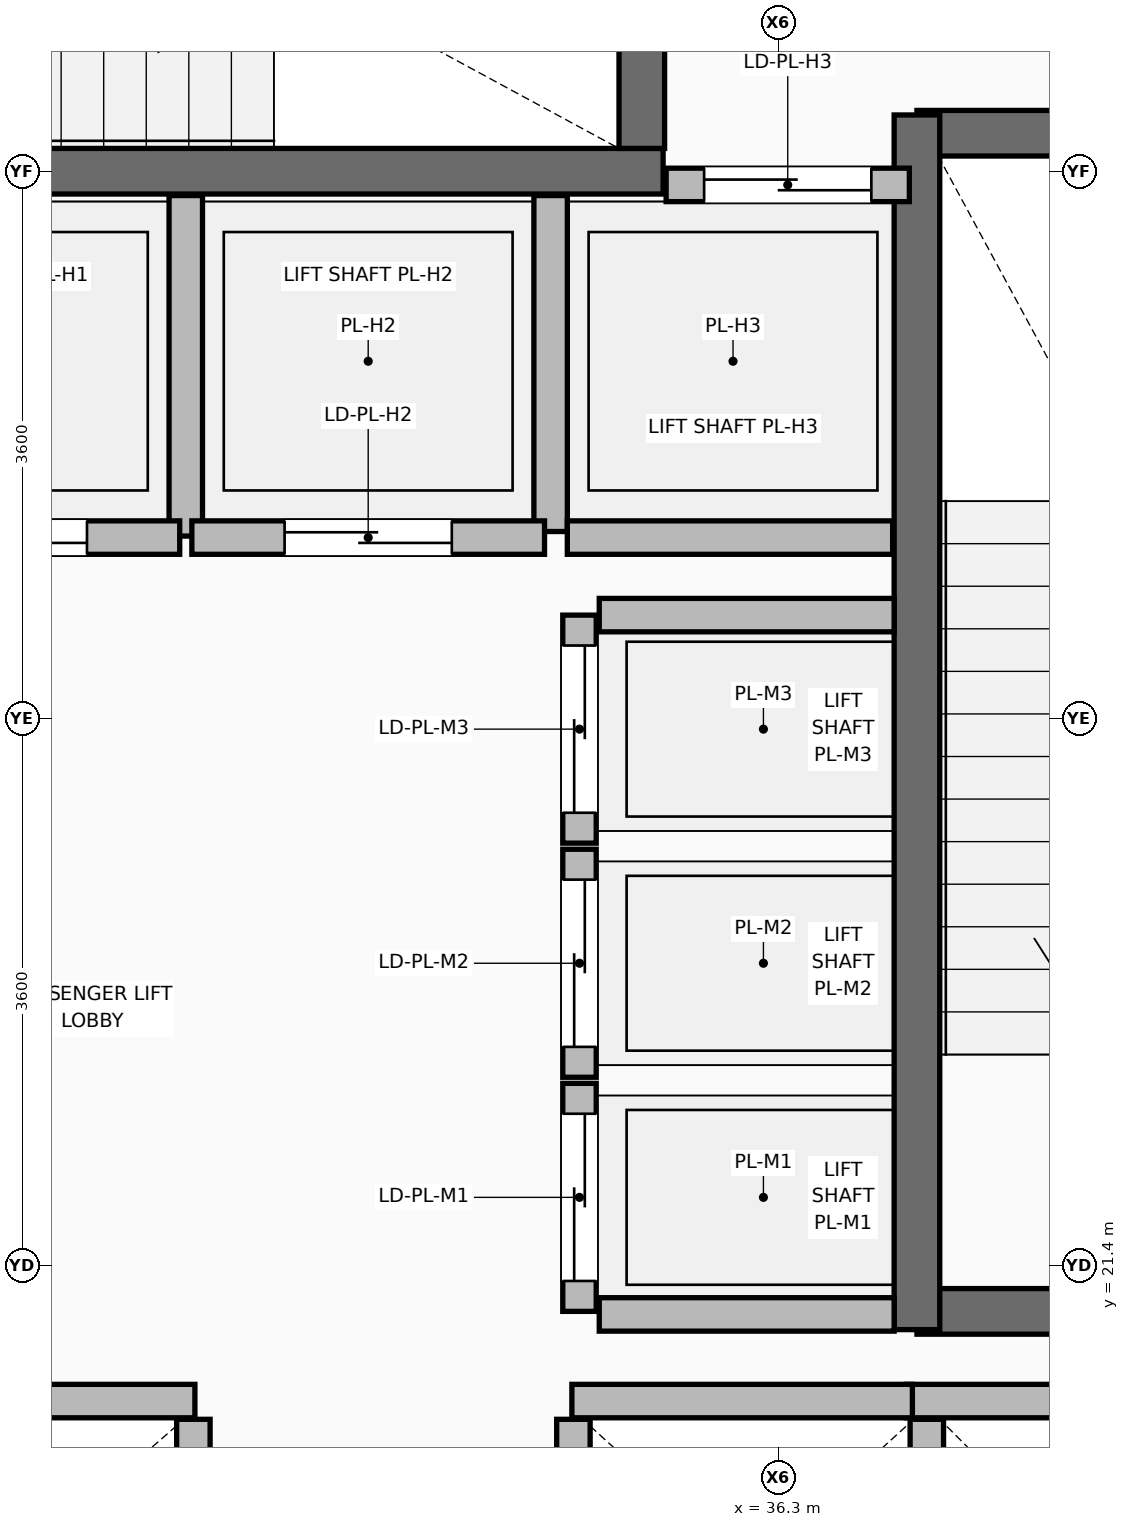
"""IFC4 building model, lengths in metres.
Left out: names, types, materials, properties, quantities, classifications, styles, units other than length and angle.
Written with IfcOpenShell. Run it as: python <this file> out.ifc"""

import sys

from ifc_helpers import new_model, si_unit, direction, frame, frame_2d, origin, place, context, subcontext, project, spatial, rectangle, extrude, element, fill, save


model = new_model("IFC4")
c1 = context("Model", 3, precision=1e-05, world=origin(), true_north=direction((0.0, 1.0)))
c2 = subcontext(c1, "Body", "Model", "MODEL_VIEW")
j1 = project(units=[si_unit("LENGTHUNIT", "METRE"), si_unit("PLANEANGLEUNIT", "RADIAN")], contexts=[c1])
p1 = place(None, origin())
s1 = spatial("IfcSite", under=j1, at=p1, CompositionType="ELEMENT")
p2 = place(p1, origin())
s2 = spatial("IfcBuilding", under=s1, at=p2, CompositionType="ELEMENT")
p3 = place(p2, frame((0.0, 0.0, 96.15)))
s3 = spatial("IfcBuildingStorey", under=s2, at=p3, CompositionType="ELEMENT", Elevation=96.15)
for number, where, z_axis, x_axis in (
    (1, (32.45, 17.92, 0.0), (0.0, 0.0, 1.0), (0.0, 1.0, 0.0)),
    (2, (34.95, 17.92, 0.0), (0.0, 0.0, 1.0), (0.0, 1.0, 0.0)),
):
    element("IfcWall", number, at=place(p3, frame(where, z_axis=z_axis, x_axis=x_axis)), inside=s3, PredefinedType="PARTITIONING", context=c2, shape_type="SweptSolid", body=[
        extrude(rectangle(XDim=2.47, YDim=0.22, at=frame_2d((1.235, 0.0))), origin(), (0.0, 0.0, 1.0), 4.056),
    ])
p4 = place(p3, frame((37.275, 18.08, 0.0), z_axis=(0.0, 0.0, 1.0), x_axis=(0.0, 1.0, 0.0)))
e3 = element("IfcWall", 3, at=p4, inside=s3, PredefinedType="PARTITIONING", context=c2, shape_type="SweptSolid", body=[
    extrude(rectangle(XDim=2.31, YDim=0.22, at=frame_2d((1.155, 0.0))), origin(), (0.0, 0.0, 1.0), 4.595),
])
p5 = place(p3, frame((32.4, 26.2, 0.0), z_axis=(0.0, 0.0, 1.0), x_axis=(0.0, 1.0, 0.0)))
e4 = element("IfcWall", 4, at=p5, inside=s3, PredefinedType="PARTITIONING", context=c2, shape_type="SweptSolid", body=[
    extrude(rectangle(XDim=2.24, YDim=0.22, at=frame_2d((1.12, 0.0))), origin(), (0.0, 0.0, 1.0), 4.595),
])
p6 = place(p3, frame((34.8, 26.23, 0.0), z_axis=(0.0, 0.0, 1.0), x_axis=(0.0, 1.0, 0.0)))
e5 = element("IfcWall", 5, at=p6, inside=s3, PredefinedType="PARTITIONING", context=c2, shape_type="SweptSolid", body=[
    extrude(rectangle(XDim=2.21, YDim=0.22, at=frame_2d((1.105, 0.0))), origin(), (0.0, 0.0, 1.0), 4.595),
])
p7 = place(p3, frame((34.91, 26.19, 0.0), z_axis=(0.0, 0.0, 1.0), x_axis=(1.0, 0.0, 0.0)))
e6 = element("IfcWall", 6, at=p7, inside=s3, PredefinedType="PARTITIONING", context=c2, shape_type="SweptSolid", body=[
    extrude(rectangle(XDim=2.14, YDim=0.22, at=frame_2d((1.07, 0.0))), origin(), (0.0, 0.0, 1.0), 4.595),
])
for number, where, z_axis, x_axis in (
    (7, (37.21, 21.1, 0.0), (0.0, 0.0, 1.0), (1.0, 0.0, 0.0)),
    (8, (37.21, 28.85, 0.0), (0.0, 0.0, 1.0), (1.0, 0.0, 0.0)),
):
    element("IfcWall", number, at=place(p3, frame(where, z_axis=z_axis, x_axis=x_axis)), inside=s3, PredefinedType="SHEAR", context=c2, shape_type="SweptSolid", body=[
        extrude(rectangle(XDim=3.615, YDim=0.3, at=frame_2d((1.808, 0.0))), origin(), (0.0, 0.0, 1.0), 4.62),
    ])
p8 = place(p3, frame((37.21, 20.98, 0.0), z_axis=(0.0, 0.0, 1.0), x_axis=(0.0, 1.0, 0.0)))
e9 = element("IfcWall", 9, at=p8, inside=s3, PredefinedType="SHEAR", context=c2, shape_type="SweptSolid", body=[
    extrude(rectangle(XDim=7.99, YDim=0.3, at=frame_2d((3.995, 0.0))), origin(), (0.0, 0.0, 1.0), 4.62),
])
p9 = place(p3, frame((27.51, 28.6, 0.0), z_axis=(0.0, 0.0, 1.0), x_axis=(1.0, 0.0, 0.0)))
e10 = element("IfcWall", 10, at=p9, inside=s3, PredefinedType="SHEAR", context=c2, shape_type="SweptSolid", body=[
    extrude(rectangle(XDim=8.03, YDim=0.3, at=frame_2d((4.015, 0.0))), origin(), (0.0, 0.0, 1.0), 4.62),
])
p10 = place(p3, frame((35.4, 28.75, 0.0), z_axis=(0.0, 0.0, 1.0), x_axis=(0.0, 1.0, 0.0)))
e11 = element("IfcWall", 11, at=p10, inside=s3, PredefinedType="SHEAR", context=c2, shape_type="SweptSolid", body=[
    extrude(rectangle(XDim=3.425, YDim=0.3, at=frame_2d((1.712, 0.0))), origin(), (0.0, 0.0, 1.0), 4.62),
])
p11 = place(p3, frame((30.04, 20.51, 0.0), z_axis=(0.0, 0.0, 1.0), x_axis=(1.0, 0.0, 0.0)))
e12 = element("IfcWall", 12, at=p11, inside=s3, PredefinedType="PARTITIONING", context=c2, shape_type="SweptSolid", body=[
    extrude(rectangle(XDim=2.42, YDim=0.22, at=frame_2d((1.21, 0.0))), origin(), (0.0, 0.0, 1.0), 4.6),
])
for number, where, z_axis, x_axis in (
    (13, (37.14, 20.51, 0.0), (0.0, 0.0, 1.0), (1.0, 0.0, 0.0)),
    (14, (34.94, 20.51, 0.0), (0.0, 0.0, 1.0), (1.0, 0.0, 0.0)),
):
    element("IfcWall", number, at=place(p3, frame(where, z_axis=z_axis, x_axis=x_axis)), inside=s3, PredefinedType="PARTITIONING", context=c2, shape_type="SweptSolid", body=[
        extrude(rectangle(XDim=2.24, YDim=0.22, at=frame_2d((1.12, 0.0))), origin(), (0.0, 0.0, 1.0), 4.6),
    ])
p12 = place(p3, frame((30.04, 26.19, 0.0), z_axis=(0.0, 0.0, 1.0), x_axis=(1.0, 0.0, 0.0)))
e15 = element("IfcWall", 15, at=p12, inside=s3, PredefinedType="PARTITIONING", context=c2, shape_type="SweptSolid", body=[
    extrude(rectangle(XDim=2.32, YDim=0.22, at=frame_2d((1.16, 0.0))), origin(), (0.0, 0.0, 1.0), 4.6),
])
p13 = place(p12, frame((0.61, 0.0, 0.0)))
e16 = element("IfcOpeningElement", 16, at=p13, cuts=e15, PredefinedType="OPENING", context=c2, shape_type="SweptSolid", body=[
    extrude(rectangle(XDim=1.1, YDim=2.2, at=frame_2d((0.55, 1.1))), frame((0.0, 0.12, 0.0), z_axis=(0.0, -1.0, 0.0), x_axis=(1.0, 0.0, 0.0)), (0.0, 0.0, 1.0), 0.24),
])
p14 = place(p3, frame((32.44, 26.19, 0.0), z_axis=(0.0, 0.0, 1.0), x_axis=(1.0, 0.0, 0.0)))
e17 = element("IfcWall", 17, at=p14, inside=s3, PredefinedType="PARTITIONING", context=c2, shape_type="SweptSolid", body=[
    extrude(rectangle(XDim=2.32, YDim=0.22, at=frame_2d((1.16, 0.0))), origin(), (0.0, 0.0, 1.0), 4.6),
])
p15 = place(p14, frame((0.61, 0.0, 0.0)))
e18 = element("IfcOpeningElement", 18, at=p15, cuts=e17, PredefinedType="OPENING", context=c2, shape_type="SweptSolid", body=[
    extrude(rectangle(XDim=1.1, YDim=2.2, at=frame_2d((0.55, 1.1))), frame((0.0, 0.12, 0.0), z_axis=(0.0, -1.0, 0.0), x_axis=(1.0, 0.0, 0.0)), (0.0, 0.0, 1.0), 0.24),
])
p16 = place(p3, frame((35.56, 28.51, 0.0), z_axis=(0.0, 0.0, 1.0), x_axis=(1.0, 0.0, 0.0)))
e19 = element("IfcWall", 19, at=p16, inside=s3, PredefinedType="PARTITIONING", context=c2, shape_type="SweptSolid", body=[
    extrude(rectangle(XDim=1.6, YDim=0.22, at=frame_2d((0.8, 0.0))), origin(), (0.0, 0.0, 1.0), 4.6),
])
p17 = place(p16, frame((0.25, 0.0, 0.0)))
e20 = element("IfcOpeningElement", 20, at=p17, cuts=e19, PredefinedType="OPENING", context=c2, shape_type="SweptSolid", body=[
    extrude(rectangle(XDim=1.1, YDim=2.2, at=frame_2d((0.55, 1.1))), frame((0.0, 0.12, 0.0), z_axis=(0.0, -1.0, 0.0), x_axis=(1.0, 0.0, 0.0)), (0.0, 0.0, 1.0), 0.24),
])
p18 = place(p3, frame((34.99, 21.1, 0.0), z_axis=(0.0, 0.0, 1.0), x_axis=(0.0, 1.0, 0.0)))
e21 = element("IfcWall", 21, at=p18, inside=s3, PredefinedType="PARTITIONING", context=c2, shape_type="SweptSolid", body=[
    extrude(rectangle(XDim=1.5, YDim=0.22, at=frame_2d((0.75, 0.0))), origin(), (0.0, 0.0, 1.0), 4.6),
])
p19 = place(p18, frame((0.2, 0.0, 0.0)))
e22 = element("IfcOpeningElement", 22, at=p19, cuts=e21, PredefinedType="OPENING", context=c2, shape_type="SweptSolid", body=[
    extrude(rectangle(XDim=1.1, YDim=2.2, at=frame_2d((0.55, 1.1))), frame((0.0, 0.12, 0.0), z_axis=(0.0, -1.0, 0.0), x_axis=(1.0, 0.0, 0.0)), (0.0, 0.0, 1.0), 0.24),
])
p20 = place(p3, frame((34.99, 22.64, 0.0), z_axis=(0.0, 0.0, 1.0), x_axis=(0.0, 1.0, 0.0)))
e23 = element("IfcWall", 23, at=p20, inside=s3, PredefinedType="PARTITIONING", context=c2, shape_type="SweptSolid", body=[
    extrude(rectangle(XDim=1.5, YDim=0.22, at=frame_2d((0.75, 0.0))), origin(), (0.0, 0.0, 1.0), 4.6),
])
p21 = place(p20, frame((0.2, 0.0, 0.0)))
e24 = element("IfcOpeningElement", 24, at=p21, cuts=e23, PredefinedType="OPENING", context=c2, shape_type="SweptSolid", body=[
    extrude(rectangle(XDim=1.1, YDim=2.2, at=frame_2d((0.55, 1.1))), frame((0.0, 0.12, 0.0), z_axis=(0.0, -1.0, 0.0), x_axis=(1.0, 0.0, 0.0)), (0.0, 0.0, 1.0), 0.24),
])
p22 = place(p3, frame((34.99, 24.18, 0.0), z_axis=(0.0, 0.0, 1.0), x_axis=(0.0, 1.0, 0.0)))
e25 = element("IfcWall", 25, at=p22, inside=s3, PredefinedType="PARTITIONING", context=c2, shape_type="SweptSolid", body=[
    extrude(rectangle(XDim=1.5, YDim=0.22, at=frame_2d((0.75, 0.0))), origin(), (0.0, 0.0, 1.0), 4.6),
])
p23 = place(p22, frame((0.2, 0.0, 0.0)))
e26 = element("IfcOpeningElement", 26, at=p23, cuts=e25, PredefinedType="OPENING", context=c2, shape_type="SweptSolid", body=[
    extrude(rectangle(XDim=1.1, YDim=2.2, at=frame_2d((0.55, 1.1))), frame((0.0, 0.12, 0.0), z_axis=(0.0, -1.0, 0.0), x_axis=(1.0, 0.0, 0.0)), (0.0, 0.0, 1.0), 0.24),
])
for number, where, z_axis, x_axis in (
    (27, (35.12, 21.08, 0.0), (0.0, 0.0, 1.0), (1.0, 0.0, 0.0)),
    (28, (35.12, 25.68, 0.0), (0.0, 0.0, 1.0), (1.0, 0.0, 0.0)),
):
    element("IfcWall", number, at=place(p3, frame(where, z_axis=z_axis, x_axis=x_axis)), inside=s3, PredefinedType="PARTITIONING", context=c2, shape_type="SweptSolid", body=[
        extrude(rectangle(XDim=1.94, YDim=0.22, at=frame_2d((0.97, 0.0))), origin(), (0.0, 0.0, 1.0), 4.6),
    ])
p24 = place(p13, frame((1.1, 0.0, 0.0), z_axis=(0.0, 0.0, 1.0), x_axis=(-1.0, 0.0, 0.0)))
e29 = element("IfcDoor", 29, at=p24, inside=s3, OperationType="DOUBLE_DOOR_SLIDING", PredefinedType="DOOR", context=c2, shape_type="SweptSolid", body=[
    extrude(rectangle(XDim=1.1, YDim=2.2, at=frame_2d((0.55, 1.1))), frame((0.0, 0.025, 0.0), z_axis=(0.0, -1.0, 0.0), x_axis=(1.0, 0.0, 0.0)), (0.0, 0.0, 1.0), 0.05),
])
fill(e16, e29)
p25 = place(p15, frame((1.1, 0.0, 0.0), z_axis=(0.0, 0.0, 1.0), x_axis=(-1.0, 0.0, 0.0)))
e30 = element("IfcDoor", 30, at=p25, inside=s3, OperationType="DOUBLE_DOOR_SLIDING", PredefinedType="DOOR", context=c2, shape_type="SweptSolid", body=[
    extrude(rectangle(XDim=1.1, YDim=2.2, at=frame_2d((0.55, 1.1))), frame((0.0, 0.025, 0.0), z_axis=(0.0, -1.0, 0.0), x_axis=(1.0, 0.0, 0.0)), (0.0, 0.0, 1.0), 0.05),
])
fill(e18, e30)
p26 = place(p17, origin())
e31 = element("IfcDoor", 31, at=p26, inside=s3, OperationType="DOUBLE_DOOR_SLIDING", PredefinedType="DOOR", context=c2, shape_type="SweptSolid", body=[
    extrude(rectangle(XDim=1.1, YDim=2.2, at=frame_2d((0.55, 1.1))), frame((0.0, 0.025, 0.0), z_axis=(0.0, -1.0, 0.0), x_axis=(1.0, 0.0, 0.0)), (0.0, 0.0, 1.0), 0.05),
])
fill(e20, e31)
p27 = place(p19, origin())
e32 = element("IfcDoor", 32, at=p27, inside=s3, OperationType="DOUBLE_DOOR_SLIDING", PredefinedType="DOOR", context=c2, shape_type="SweptSolid", body=[
    extrude(rectangle(XDim=1.1, YDim=2.2, at=frame_2d((0.55, 1.1))), frame((0.0, 0.025, 0.0), z_axis=(0.0, -1.0, 0.0), x_axis=(1.0, 0.0, 0.0)), (0.0, 0.0, 1.0), 0.05),
])
fill(e22, e32)
p28 = place(p21, origin())
e33 = element("IfcDoor", 33, at=p28, inside=s3, OperationType="DOUBLE_DOOR_SLIDING", PredefinedType="DOOR", context=c2, shape_type="SweptSolid", body=[
    extrude(rectangle(XDim=1.1, YDim=2.2, at=frame_2d((0.55, 1.1))), frame((0.0, 0.025, 0.0), z_axis=(0.0, -1.0, 0.0), x_axis=(1.0, 0.0, 0.0)), (0.0, 0.0, 1.0), 0.05),
])
fill(e24, e33)
p29 = place(p23, origin())
e34 = element("IfcDoor", 34, at=p29, inside=s3, OperationType="DOUBLE_DOOR_SLIDING", PredefinedType="DOOR", context=c2, shape_type="SweptSolid", body=[
    extrude(rectangle(XDim=1.1, YDim=2.2, at=frame_2d((0.55, 1.1))), frame((0.0, 0.025, 0.0), z_axis=(0.0, -1.0, 0.0), x_axis=(1.0, 0.0, 0.0)), (0.0, 0.0, 1.0), 0.05),
])
fill(e26, e34)
save(model, sys.argv[1])
